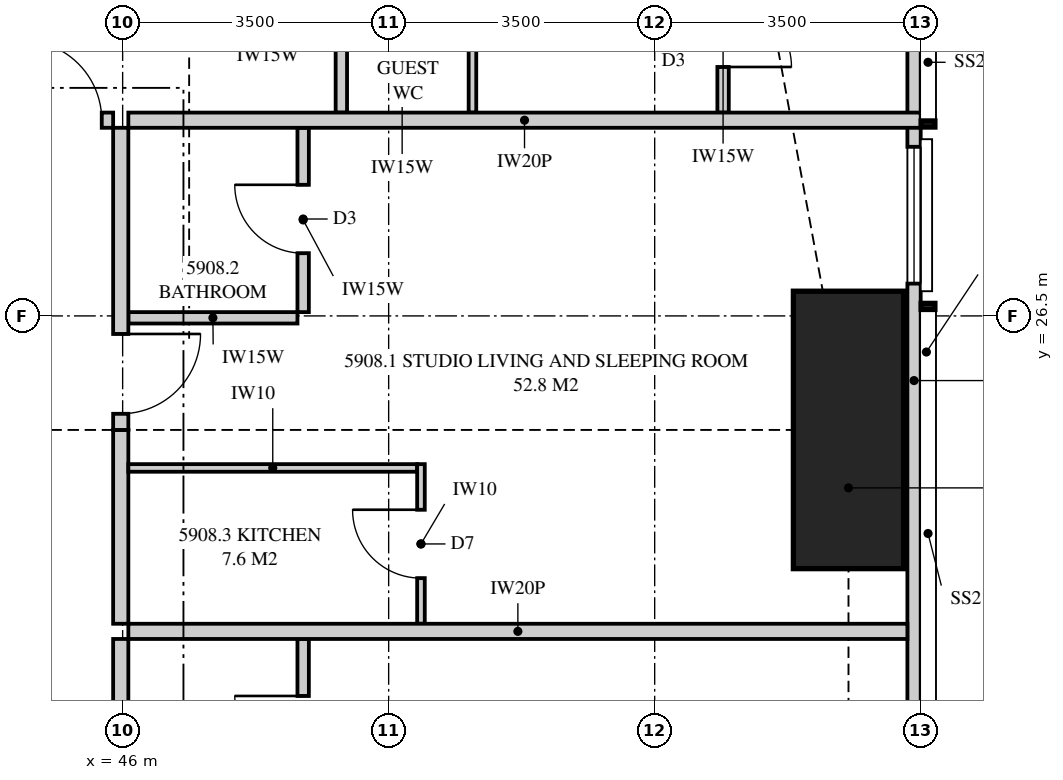
"""IFC4 building model, lengths in metres.
Left out: names, types, materials, properties, quantities, classifications, styles, units other than length and angle.
Written with IfcOpenShell. Run it as: python <this file> out.ifc"""

import sys

from ifc_helpers import new_model, si_unit, direction, frame, frame_2d, origin, origin_2d, place, context, subcontext, project, spatial, polyline, rectangle, outline, extrude, element, fill, save


model = new_model("IFC4")
c1 = context("Model", 3, precision=1e-05, world=origin(), true_north=direction((0.0, 1.0)))
c2 = subcontext(c1, "Body", "Model", "MODEL_VIEW")
j1 = project(units=[si_unit("LENGTHUNIT", "METRE"), si_unit("PLANEANGLEUNIT", "RADIAN")], contexts=[c1])
p1 = place(None, origin())
s1 = spatial("IfcSite", under=j1, at=p1, CompositionType="ELEMENT")
p2 = place(p1, origin())
s2 = spatial("IfcBuilding", under=s1, at=p2, CompositionType="ELEMENT")
p3 = place(p2, frame((0.0, 0.0, 217.95)))
s3 = spatial("IfcBuildingStorey", under=s2, at=p3, CompositionType="ELEMENT", Elevation=217.95)
p4 = place(p3, frame((55.55, 25.0, 0.0), z_axis=(0.0, 0.0, 1.0), x_axis=(1.0, 0.0, 0.0)))
e1 = element("IfcColumn", 1, at=p4, inside=s3, PredefinedType="COLUMN", context=c2, shape_type="SweptSolid", body=[
    extrude(rectangle(XDim=1.45, YDim=3.65, at=origin_2d()), origin(), (0.0, 0.0, 1.0), 3.5),
])
p5 = place(p3, frame((56.413, 20.35, 0.0), z_axis=(0.0, 0.0, 1.0), x_axis=(0.0, 1.0, 0.0)))
e2 = element("IfcWall", 2, at=p5, inside=s3, PredefinedType="SOLIDWALL", context=c2, shape_type="SweptSolid", body=[
    extrude(outline(polyline([(0.0, 0.0), (10.599, 0.0), (10.599, 3.26), (4.858, 3.26), (4.858, 2.3), (4.793, 2.3), (4.793, 3.26), (4.65, 3.26), (4.65, 2.3), (0.0, 2.3), (0.0, 0.0)])), frame((0.0, 0.087, 0.0), z_axis=(0.0, -1.0, 0.0), x_axis=(1.0, 0.0, 0.0)), (0.0, 0.0, 1.0), 0.175),
])
p6 = place(p5, frame((6.575, 0.0, 0.4)))
e3 = element("IfcOpeningElement", 3, at=p6, cuts=e2, PredefinedType="OPENING", context=c2, shape_type="SweptSolid", body=[
    extrude(rectangle(XDim=1.8, YDim=1.85, at=frame_2d((0.9, 0.925))), frame((0.0, 0.097, 0.0), z_axis=(0.0, -1.0, 0.0), x_axis=(1.0, 0.0, 0.0)), (0.0, 0.0, 1.0), 0.195),
])
p7 = place(p3, frame((38.8, 29.075, 0.0), z_axis=(0.0, 0.0, 1.0), x_axis=(1.0, 0.0, 0.0)))
e4 = element("IfcWall", 4, at=p7, inside=s3, PredefinedType="PARTITIONING", context=c2, shape_type="SweptSolid", body=[
    extrude(outline(polyline([(0.0, 0.0), (7.075, 0.0), (7.075, 3.26), (7.075, 2.66), (6.765, 2.66), (6.765, 3.26), (0.0, 3.26), (0.0, 0.0)])), frame((0.0, 0.1, 0.0), z_axis=(0.0, -1.0, 0.0), x_axis=(1.0, 0.0, 0.0)), (0.0, 0.0, 1.0), 0.2),
])
p8 = place(p7, frame((5.875, 0.0, 0.0)))
e5 = element("IfcOpeningElement", 5, at=p8, cuts=e4, PredefinedType="OPENING", context=c2, shape_type="SweptSolid", body=[
    extrude(rectangle(XDim=1.05, YDim=2.2, at=frame_2d((0.525, 1.1))), frame((0.0, 0.11, 0.0), z_axis=(0.0, -1.0, 0.0), x_axis=(1.0, 0.0, 0.0)), (0.0, 0.0, 1.0), 0.22),
])
p9 = place(p3, frame((53.9, 31.4, 0.0), z_axis=(0.0, 0.0, 1.0), x_axis=(0.0, -1.0, 0.0)))
e6 = element("IfcWall", 6, at=p9, inside=s3, PredefinedType="PLUMBINGWALL", context=c2, shape_type="SweptSolid", body=[
    extrude(outline(polyline([(2.225, 2.3), (0.0, 2.3), (0.0, 0.548), (0.199, 0.51), (0.355, 0.425), (0.418, 0.0), (2.225, 0.0), (2.225, 2.3)])), frame((0.0, 0.075, 0.0), z_axis=(0.0, -1.0, 0.0), x_axis=(1.0, 0.0, 0.0)), (0.0, 0.0, 1.0), 0.15),
])
p10 = place(p9, frame((0.725, 0.0, 0.0)))
e7 = element("IfcOpeningElement", 7, at=p10, cuts=e6, PredefinedType="OPENING", context=c2, shape_type="SweptSolid", body=[
    extrude(rectangle(XDim=0.9, YDim=2.1, at=frame_2d((0.45, 1.05))), frame((0.0, 0.085, 0.0), z_axis=(0.0, -1.0, 0.0), x_axis=(1.0, 0.0, 0.0)), (0.0, 0.0, 1.0), 0.17),
])
p11 = place(p3, frame((50.603, 33.825, 0.0), z_axis=(0.0, 0.0, 1.0), x_axis=(0.0, -1.0, 0.0)))
e8 = element("IfcWall", 8, at=p11, inside=s3, PredefinedType="PARTITIONING", context=c2, shape_type="SweptSolid", body=[
    extrude(outline(polyline([(0.0, 0.0), (4.65, 0.0), (4.65, 3.26), (2.279, 3.26), (2.279, 2.3), (0.534, 2.3), (0.534, 3.26), (0.0, 3.26), (0.0, 0.0)])), frame((0.0, 0.05, 0.0), z_axis=(0.0, -1.0, 0.0), x_axis=(1.0, 0.0, 0.0)), (0.0, 0.0, 1.0), 0.1),
])
p12 = place(p11, frame((0.15, 0.0, 0.0)))
e9 = element("IfcOpeningElement", 9, at=p12, cuts=e8, PredefinedType="OPENING", context=c2, shape_type="SweptSolid", body=[
    extrude(rectangle(XDim=0.9, YDim=2.1, at=frame_2d((0.45, 1.05))), frame((0.0, 0.06, 0.0), z_axis=(0.0, -1.0, 0.0), x_axis=(1.0, 0.0, 0.0)), (0.0, 0.0, 1.0), 0.12),
])
p13 = place(p3, frame((46.075, 29.075, 0.0), z_axis=(0.0, 0.0, 1.0), x_axis=(1.0, 0.0, 0.0)))
e10 = element("IfcWall", 10, at=p13, inside=s3, PredefinedType="PARTITIONING", context=c2, shape_type="SweptSolid", body=[
    extrude(outline(polyline([(0.0, 0.0), (10.425, 0.0), (10.425, 3.26), (9.646, 3.26), (9.646, 2.3), (7.795, 2.3), (7.795, 3.26), (2.11, 3.26), (2.11, 2.66), (0.0, 2.66), (0.0, 3.26), (0.0, 0.0)])), frame((0.0, 0.1, 0.0), z_axis=(0.0, -1.0, 0.0), x_axis=(1.0, 0.0, 0.0)), (0.0, 0.0, 1.0), 0.2),
])
p14 = place(p3, frame((56.325, 22.35, 0.0), z_axis=(0.0, 0.0, 1.0), x_axis=(-1.0, 0.0, 0.0)))
e11 = element("IfcWall", 11, at=p14, inside=s3, PredefinedType="PARTITIONING", context=c2, shape_type="SweptSolid", body=[
    extrude(outline(polyline([(0.0, 0.0), (10.25, 0.0), (10.25, 3.26), (1.685, 3.26), (1.685, 2.3), (0.0, 2.3), (0.0, 3.26), (0.0, 0.0)])), frame((0.0, 0.1, 0.0), z_axis=(0.0, -1.0, 0.0), x_axis=(1.0, 0.0, 0.0)), (0.0, 0.0, 1.0), 0.2),
])
p15 = place(p3, frame((45.975, 14.25, 0.0), z_axis=(0.0, 0.0, 1.0), x_axis=(0.0, 1.0, 0.0)))
e12 = element("IfcWall", 12, at=p15, inside=s3, PredefinedType="PARTITIONING", context=c2, shape_type="SweptSolid", body=[
    extrude(outline(polyline([(0.0, 0.0), (8.0, 0.0), (8.0, 3.26), (5.81, 3.26), (5.81, 2.66), (3.19, 2.66), (3.19, 3.26), (0.06, 3.26), (0.06, 2.66), (0.0, 2.66), (0.0, 3.26), (0.0, 0.0)])), frame((0.0, 0.1, 0.0), z_axis=(0.0, -1.0, 0.0), x_axis=(1.0, 0.0, 0.0)), (0.0, 0.0, 1.0), 0.2),
])
p16 = place(p15, frame((3.5, 0.0, 0.0)))
e13 = element("IfcOpeningElement", 13, at=p16, cuts=e12, PredefinedType="OPENING", context=c2, shape_type="SweptSolid", body=[
    extrude(rectangle(XDim=1.05, YDim=2.2, at=frame_2d((0.525, 1.1))), frame((0.0, 0.11, 0.0), z_axis=(0.0, -1.0, 0.0), x_axis=(1.0, 0.0, 0.0)), (0.0, 0.0, 1.0), 0.22),
])
p17 = place(p3, frame((48.375, 19.825, 0.0), z_axis=(0.0, 0.0, 1.0), x_axis=(0.0, 1.0, 0.0)))
e14 = element("IfcWall", 14, at=p17, inside=s3, PredefinedType="PLUMBINGWALL", context=c2, shape_type="SweptSolid", body=[
    extrude(outline(polyline([(0.0, 0.0), (2.425, 0.0), (2.425, 3.26), (0.21, 3.26), (0.21, 2.66), (0.0, 2.66), (0.0, 3.26), (0.0, 0.0)])), frame((0.0, 0.075, 0.0), z_axis=(0.0, -1.0, 0.0), x_axis=(1.0, 0.0, 0.0)), (0.0, 0.0, 1.0), 0.15),
])
p18 = place(p17, frame((0.775, 0.0, 0.0)))
e15 = element("IfcOpeningElement", 15, at=p18, cuts=e14, PredefinedType="OPENING", context=c2, shape_type="SweptSolid", body=[
    extrude(rectangle(XDim=0.9, YDim=2.1, at=frame_2d((0.45, 1.05))), frame((0.0, 0.085, 0.0), z_axis=(0.0, -1.0, 0.0), x_axis=(1.0, 0.0, 0.0)), (0.0, 0.0, 1.0), 0.17),
])
p19 = place(p3, frame((45.975, 22.45, 0.0), z_axis=(0.0, 0.0, 1.0), x_axis=(0.0, 1.0, 0.0)))
e16 = element("IfcWall", 16, at=p19, inside=s3, PredefinedType="PARTITIONING", context=c2, shape_type="SweptSolid", body=[
    extrude(outline(polyline([(0.0, 0.0), (2.55, 0.0), (2.55, 2.66), (1.24, 2.66), (1.24, 3.26), (0.0, 3.26), (0.0, 0.0)])), frame((0.0, 0.1, 0.0), z_axis=(0.0, -1.0, 0.0), x_axis=(1.0, 0.0, 0.0)), (0.0, 0.0, 1.0), 0.2),
])
p20 = place(p3, frame((45.975, 25.0, 0.0), z_axis=(0.0, 0.0, 1.0), x_axis=(0.0, 1.0, 0.0)))
e17 = element("IfcWall", 17, at=p20, inside=s3, PredefinedType="PARTITIONING", context=c2, shape_type="SweptSolid", body=[
    extrude(rectangle(XDim=3.975, YDim=0.2, at=frame_2d((1.988, 0.0))), origin(), (0.0, 0.0, 1.0), 2.66),
])
p21 = place(p20, frame((0.212, 0.0, 0.0)))
e18 = element("IfcOpeningElement", 18, at=p21, cuts=e17, PredefinedType="OPENING", context=c2, shape_type="SweptSolid", body=[
    extrude(rectangle(XDim=1.05, YDim=2.2, at=frame_2d((0.525, 1.1))), frame((0.0, 0.11, 0.0), z_axis=(0.0, -1.0, 0.0), x_axis=(1.0, 0.0, 0.0)), (0.0, 0.0, 1.0), 0.22),
])
p22 = place(p3, frame((48.375, 26.55, 0.0), z_axis=(0.0, 0.0, 1.0), x_axis=(0.0, 1.0, 0.0)))
e19 = element("IfcWall", 19, at=p22, inside=s3, PredefinedType="PLUMBINGWALL", context=c2, shape_type="SweptSolid", body=[
    extrude(rectangle(XDim=2.425, YDim=0.15, at=frame_2d((1.212, 0.0))), origin(), (0.0, 0.0, 1.0), 3.26),
])
p23 = place(p22, frame((0.775, 0.0, 0.0)))
e20 = element("IfcOpeningElement", 20, at=p23, cuts=e19, PredefinedType="OPENING", context=c2, shape_type="SweptSolid", body=[
    extrude(rectangle(XDim=0.9, YDim=2.1, at=frame_2d((0.45, 1.05))), frame((0.0, 0.085, 0.0), z_axis=(0.0, -1.0, 0.0), x_axis=(1.0, 0.0, 0.0)), (0.0, 0.0, 1.0), 0.17),
])
p24 = place(p3, frame((48.3, 26.475, 0.0), z_axis=(0.0, 0.0, 1.0), x_axis=(-1.0, 0.0, 0.0)))
e21 = element("IfcWall", 21, at=p24, inside=s3, PredefinedType="PLUMBINGWALL", context=c2, shape_type="SweptSolid", body=[
    extrude(outline(polyline([(0.0, 0.0), (2.225, 0.0), (2.225, 3.26), (2.225, 2.66), (0.14, 2.66), (0.14, 3.26), (0.0, 3.26), (0.0, 0.0)])), frame((0.0, 0.075, 0.0), z_axis=(0.0, -1.0, 0.0), x_axis=(1.0, 0.0, 0.0)), (0.0, 0.0, 1.0), 0.15),
])
p25 = place(p3, frame((48.877, 29.175, 0.0), z_axis=(0.0, 0.0, 1.0), x_axis=(0.0, 1.0, 0.0)))
e22 = element("IfcWall", 22, at=p25, inside=s3, PredefinedType="PLUMBINGWALL", context=c2, shape_type="SweptSolid", body=[
    extrude(rectangle(XDim=2.0, YDim=0.15, at=frame_2d((1.0, 0.0))), origin(), (0.0, 0.0, 1.0), 3.26),
])
p26 = place(p3, frame((49.925, 22.45, 0.0), z_axis=(0.0, 0.0, 1.0), x_axis=(0.0, 1.0, 0.0)))
e23 = element("IfcWall", 23, at=p26, inside=s3, PredefinedType="PARTITIONING", context=c2, shape_type="SweptSolid", body=[
    extrude(outline(polyline([(0.0, 0.0), (2.1, 0.0), (2.1, 3.26), (2.1, 2.66), (1.29, 2.66), (1.29, 3.26), (0.0, 3.26), (0.0, 0.0)])), frame((0.0, 0.05, 0.0), z_axis=(0.0, -1.0, 0.0), x_axis=(1.0, 0.0, 0.0)), (0.0, 0.0, 1.0), 0.1),
])
p27 = place(p26, frame((0.6, 0.0, 0.0)))
e24 = element("IfcOpeningElement", 24, at=p27, cuts=e23, PredefinedType="OPENING", context=c2, shape_type="SweptSolid", body=[
    extrude(rectangle(XDim=0.9, YDim=2.1, at=frame_2d((0.45, 1.05))), frame((0.0, 0.06, 0.0), z_axis=(0.0, -1.0, 0.0), x_axis=(1.0, 0.0, 0.0)), (0.0, 0.0, 1.0), 0.12),
])
p28 = place(p3, frame((46.075, 24.5, 0.0), z_axis=(0.0, 0.0, 1.0), x_axis=(1.0, 0.0, 0.0)))
e25 = element("IfcWall", 25, at=p28, inside=s3, PredefinedType="PARTITIONING", context=c2, shape_type="SweptSolid", body=[
    extrude(outline(polyline([(0.0, 0.0), (3.8, 0.0), (3.8, 3.26), (3.8, 2.66), (0.0, 2.66), (0.0, 3.26), (0.0, 0.0)])), frame((0.0, 0.05, 0.0), z_axis=(0.0, -1.0, 0.0), x_axis=(1.0, 0.0, 0.0)), (0.0, 0.0, 1.0), 0.1),
])
p29 = place(p6, origin())
e26 = element("IfcWindow", 26, at=p29, inside=s3, PartitioningType="SINGLE_PANEL", PredefinedType="WINDOW", context=c2, shape_type="SweptSolid", body=[
    extrude(rectangle(XDim=1.8, YDim=1.85, at=frame_2d((0.9, 0.925))), frame((0.0, 0.03, 0.0), z_axis=(0.0, -1.0, 0.0), x_axis=(1.0, 0.0, 0.0)), (0.0, 0.0, 1.0), 0.06),
])
fill(e3, e26)
p30 = place(p8, origin())
e27 = element("IfcDoor", 27, at=p30, inside=s3, OperationType="SINGLE_SWING_LEFT", PredefinedType="DOOR", context=c2, shape_type="SweptSolid", body=[
    extrude(rectangle(XDim=1.05, YDim=2.2, at=frame_2d((0.525, 1.1))), frame((0.0, 0.025, 0.0), z_axis=(0.0, -1.0, 0.0), x_axis=(1.0, 0.0, 0.0)), (0.0, 0.0, 1.0), 0.05),
])
fill(e5, e27)
p31 = place(p10, origin())
e28 = element("IfcDoor", 28, at=p31, inside=s3, OperationType="SINGLE_SWING_RIGHT", PredefinedType="DOOR", context=c2, shape_type="SweptSolid", body=[
    extrude(rectangle(XDim=0.9, YDim=2.1, at=frame_2d((0.45, 1.05))), frame((0.0, 0.025, 0.0), z_axis=(0.0, -1.0, 0.0), x_axis=(1.0, 0.0, 0.0)), (0.0, 0.0, 1.0), 0.05),
])
fill(e7, e28)
p32 = place(p18, origin())
e29 = element("IfcDoor", 29, at=p32, inside=s3, OperationType="SINGLE_SWING_RIGHT", PredefinedType="DOOR", context=c2, shape_type="SweptSolid", body=[
    extrude(rectangle(XDim=0.9, YDim=2.1, at=frame_2d((0.45, 1.05))), frame((0.0, 0.025, 0.0), z_axis=(0.0, -1.0, 0.0), x_axis=(1.0, 0.0, 0.0)), (0.0, 0.0, 1.0), 0.05),
])
fill(e15, e29)
p33 = place(p21, frame((1.05, 0.0, 0.0), z_axis=(0.0, 0.0, 1.0), x_axis=(-1.0, 0.0, 0.0)))
e30 = element("IfcDoor", 30, at=p33, inside=s3, OperationType="SINGLE_SWING_LEFT", PredefinedType="DOOR", context=c2, shape_type="SweptSolid", body=[
    extrude(rectangle(XDim=1.05, YDim=2.2, at=frame_2d((0.525, 1.1))), frame((0.0, 0.025, 0.0), z_axis=(0.0, -1.0, 0.0), x_axis=(1.0, 0.0, 0.0)), (0.0, 0.0, 1.0), 0.05),
])
fill(e18, e30)
p34 = place(p23, origin())
e31 = element("IfcDoor", 31, at=p34, inside=s3, OperationType="SINGLE_SWING_RIGHT", PredefinedType="DOOR", context=c2, shape_type="SweptSolid", body=[
    extrude(rectangle(XDim=0.9, YDim=2.1, at=frame_2d((0.45, 1.05))), frame((0.0, 0.025, 0.0), z_axis=(0.0, -1.0, 0.0), x_axis=(1.0, 0.0, 0.0)), (0.0, 0.0, 1.0), 0.05),
])
fill(e20, e31)
p35 = place(p27, origin())
e32 = element("IfcDoor", 32, at=p35, inside=s3, OperationType="SINGLE_SWING_RIGHT", PredefinedType="DOOR", context=c2, shape_type="SweptSolid", body=[
    extrude(rectangle(XDim=0.9, YDim=2.1, at=frame_2d((0.45, 1.05))), frame((0.0, 0.025, 0.0), z_axis=(0.0, -1.0, 0.0), x_axis=(1.0, 0.0, 0.0)), (0.0, 0.0, 1.0), 0.05),
])
fill(e24, e32)
save(model, sys.argv[1])
